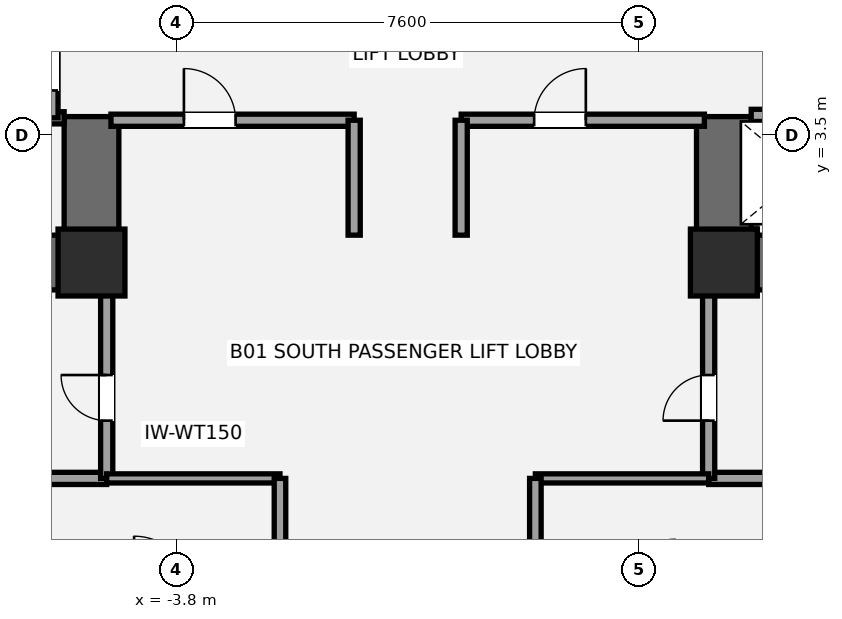
"""IFC4 building model, lengths in metres.
Left out: names, types, materials, properties, quantities, classifications, styles, units other than length and angle.
Written with IfcOpenShell. Run it as: python <this file> out.ifc"""

import sys

from ifc_helpers import new_model, si_unit, direction, frame, frame_2d, origin, origin_2d, place, context, subcontext, project, spatial, rectangle, extrude, element, fill, save


model = new_model("IFC4")
c1 = context("Model", 3, precision=1e-05, world=origin(), true_north=direction((0.0, 1.0)))
c2 = subcontext(c1, "Body", "Model", "MODEL_VIEW")
j1 = project(units=[si_unit("LENGTHUNIT", "METRE"), si_unit("PLANEANGLEUNIT", "RADIAN")], contexts=[c1])
p1 = place(None, origin())
s1 = spatial("IfcSite", under=j1, at=p1, CompositionType="ELEMENT")
p2 = place(p1, origin())
s2 = spatial("IfcBuilding", under=s1, at=p2, CompositionType="ELEMENT")
p3 = place(p2, frame((0.0, 0.0, -4.4)))
s3 = spatial("IfcBuildingStorey", under=s2, at=p3, CompositionType="ELEMENT", Elevation=-4.4)
p4 = place(p3, frame((-4.75, 1.4, 0.0), z_axis=(0.0, 0.0, 1.0), x_axis=(-1.0, 0.0, 0.0)))
e1 = element("IfcWall", 1, at=p4, inside=s3, PredefinedType="SHEAR", context=c2, shape_type="SweptSolid", body=[
    extrude(rectangle(XDim=9.3, YDim=0.9, at=frame_2d((4.65, 0.0))), origin(), (0.0, 0.0, 1.0), 4.4),
])
p5 = place(p4, frame((5.55, 0.0, 0.0)))
e2 = element("IfcOpeningElement", 2, at=p5, cuts=e1, PredefinedType="OPENING", context=c2, shape_type="SweptSolid", body=[
    extrude(rectangle(XDim=1.05, YDim=2.15, at=frame_2d((0.525, 1.075))), frame((0.0, 0.46, 0.0), z_axis=(0.0, -1.0, 0.0), x_axis=(1.0, 0.0, 0.0)), (0.0, 0.0, 1.0), 0.92),
])
p6 = place(p4, frame((3.88, 0.0, 0.0)))
e3 = element("IfcOpeningElement", 3, at=p6, cuts=e1, PredefinedType="OPENING", context=c2, shape_type="SweptSolid", body=[
    extrude(rectangle(XDim=1.1, YDim=2.2, at=frame_2d((0.55, 1.1))), frame((0.0, 0.46, 0.0), z_axis=(0.0, -1.0, 0.0), x_axis=(1.0, 0.0, 0.0)), (0.0, 0.0, 1.0), 0.92),
])
p7 = place(p3, frame((-5.2, 0.95, 0.0), z_axis=(0.0, 0.0, 1.0), x_axis=(0.0, 1.0, 0.0)))
e4 = element("IfcWall", 4, at=p7, inside=s3, PredefinedType="SHEAR", context=c2, shape_type="SweptSolid", body=[
    extrude(rectangle(XDim=2.85, YDim=0.9, at=frame_2d((1.425, 0.0))), origin(), (0.0, 0.0, 1.0), 4.4),
])
p8 = place(p3, frame((14.05, 1.4, 0.0), z_axis=(0.0, 0.0, 1.0), x_axis=(-1.0, 0.0, 0.0)))
e5 = element("IfcWall", 5, at=p8, inside=s3, PredefinedType="SHEAR", context=c2, shape_type="SweptSolid", body=[
    extrude(rectangle(XDim=9.3, YDim=0.9, at=frame_2d((4.65, 0.0))), origin(), (0.0, 0.0, 1.0), 4.4),
])
p9 = place(p8, frame((2.7, 0.0, 0.0)))
e6 = element("IfcOpeningElement", 6, at=p9, cuts=e5, PredefinedType="OPENING", context=c2, shape_type="SweptSolid", body=[
    extrude(rectangle(XDim=1.05, YDim=2.15, at=frame_2d((0.525, 1.075))), frame((0.0, 0.46, 0.0), z_axis=(0.0, -1.0, 0.0), x_axis=(1.0, 0.0, 0.0)), (0.0, 0.0, 1.0), 0.92),
])
p10 = place(p8, frame((4.7, 0.0, 0.0)))
e7 = element("IfcOpeningElement", 7, at=p10, cuts=e5, PredefinedType="OPENING", context=c2, shape_type="SweptSolid", body=[
    extrude(rectangle(XDim=1.1, YDim=2.2, at=frame_2d((0.55, 1.1))), frame((0.0, 0.46, 0.0), z_axis=(0.0, -1.0, 0.0), x_axis=(1.0, 0.0, 0.0)), (0.0, 0.0, 1.0), 0.92),
])
p11 = place(p3, frame((5.2, 0.95, 0.0), z_axis=(0.0, 0.0, 1.0), x_axis=(0.0, 1.0, 0.0)))
e8 = element("IfcWall", 8, at=p11, inside=s3, PredefinedType="SHEAR", context=c2, shape_type="SweptSolid", body=[
    extrude(rectangle(XDim=2.85, YDim=0.9, at=frame_2d((1.425, 0.0))), origin(), (0.0, 0.0, 1.0), 4.4),
])
for number, where, z_axis, x_axis in (
    (9, (-5.2, 1.4, 0.0), (0.0, 0.0, 1.0), (1.0, 0.0, 0.0)),
    (10, (5.2, 1.4, 0.0), (0.0, 0.0, 1.0), (1.0, 0.0, 0.0)),
):
    element("IfcColumn", number, at=place(p3, frame(where, z_axis=z_axis, x_axis=x_axis)), inside=s3, PredefinedType="COLUMN", context=c2, shape_type="SweptSolid", body=[
        extrude(rectangle(XDim=1.1, YDim=1.1, at=origin_2d()), origin(), (0.0, 0.0, 1.0), 4.4),
    ])
p12 = place(p3, frame((-7.2, -2.15, 0.0), z_axis=(0.0, 0.0, 1.0), x_axis=(1.0, 0.0, 0.0)))
e11 = element("IfcWall", 11, at=p12, inside=s3, PredefinedType="SOLIDWALL", context=c2, shape_type="SweptSolid", body=[
    extrude(rectangle(XDim=2.25, YDim=0.2, at=frame_2d((1.125, 0.0))), origin(), (0.0, 0.0, 1.0), 4.14),
])
p13 = place(p3, frame((-4.95, -2.15, 0.0), z_axis=(0.0, 0.0, 1.0), x_axis=(0.0, 1.0, 0.0)))
e12 = element("IfcWall", 12, at=p13, inside=s3, PredefinedType="SOLIDWALL", context=c2, shape_type="SweptSolid", body=[
    extrude(rectangle(XDim=3.15, YDim=0.2, at=frame_2d((1.575, 0.0))), origin(), (0.0, 0.0, 1.0), 3.508),
])
p14 = place(p13, frame((0.95, 0.0, 0.0)))
e13 = element("IfcOpeningElement", 13, at=p14, cuts=e12, PredefinedType="OPENING", context=c2, shape_type="SweptSolid", body=[
    extrude(rectangle(XDim=0.75, YDim=2.1, at=frame_2d((0.375, 1.05))), frame((0.0, 0.11, 0.0), z_axis=(0.0, -1.0, 0.0), x_axis=(1.0, 0.0, 0.0)), (0.0, 0.0, 1.0), 0.22),
])
p15 = place(p3, frame((4.95, -2.15, 0.0), z_axis=(0.0, 0.0, 1.0), x_axis=(1.0, 0.0, 0.0)))
e14 = element("IfcWall", 14, at=p15, inside=s3, PredefinedType="SOLIDWALL", context=c2, shape_type="SweptSolid", body=[
    extrude(rectangle(XDim=2.25, YDim=0.2, at=frame_2d((1.125, 0.0))), origin(), (0.0, 0.0, 1.0), 4.14),
])
p16 = place(p3, frame((4.95, -2.15, 0.0), z_axis=(0.0, 0.0, 1.0), x_axis=(0.0, 1.0, 0.0)))
e15 = element("IfcWall", 15, at=p16, inside=s3, PredefinedType="SOLIDWALL", context=c2, shape_type="SweptSolid", body=[
    extrude(rectangle(XDim=3.15, YDim=0.2, at=frame_2d((1.575, 0.0))), origin(), (0.0, 0.0, 1.0), 3.508),
])
p17 = place(p16, frame((0.95, 0.0, 0.0)))
e16 = element("IfcOpeningElement", 16, at=p17, cuts=e15, PredefinedType="OPENING", context=c2, shape_type="SweptSolid", body=[
    extrude(rectangle(XDim=0.75, YDim=2.1, at=frame_2d((0.375, 1.05))), frame((0.0, 0.11, 0.0), z_axis=(0.0, -1.0, 0.0), x_axis=(1.0, 0.0, 0.0)), (0.0, 0.0, 1.0), 0.22),
])
p18 = place(p3, frame((-9.78, 3.78, 0.0), z_axis=(0.0, 0.0, 1.0), x_axis=(1.0, 0.0, 0.0)))
e17 = element("IfcWall", 17, at=p18, inside=s3, PredefinedType="SOLIDWALL", context=c2, shape_type="SweptSolid", body=[
    extrude(rectangle(XDim=4.13, YDim=0.2, at=frame_2d((2.065, 0.0))), origin(), (0.0, 0.0, 1.0), 4.14),
])
p19 = place(p3, frame((-5.85, 3.78, 0.0), z_axis=(0.0, 0.0, 1.0), x_axis=(0.0, 1.0, 0.0)))
e18 = element("IfcWall", 18, at=p19, inside=s3, PredefinedType="SOLIDWALL", context=c2, shape_type="SweptSolid", body=[
    extrude(rectangle(XDim=1.69, YDim=0.2, at=frame_2d((0.845, 0.0))), origin(), (0.0, 0.0, 1.0), 4.14),
])
p20 = place(p19, frame((0.45, 0.0, 0.0)))
e19 = element("IfcOpeningElement", 19, at=p20, cuts=e18, PredefinedType="OPENING", context=c2, shape_type="SweptSolid", body=[
    extrude(rectangle(XDim=0.85, YDim=2.1, at=frame_2d((0.425, 1.05))), frame((0.0, 0.11, 0.0), z_axis=(0.0, -1.0, 0.0), x_axis=(1.0, 0.0, 0.0)), (0.0, 0.0, 1.0), 0.22),
])
p21 = place(p3, frame((5.65, 3.82, 0.0), z_axis=(0.0, 0.0, 1.0), x_axis=(1.0, 0.0, 0.0)))
e20 = element("IfcWall", 20, at=p21, inside=s3, PredefinedType="SOLIDWALL", context=c2, shape_type="SweptSolid", body=[
    extrude(rectangle(XDim=4.13, YDim=0.2, at=frame_2d((2.065, 0.0))), origin(), (0.0, 0.0, 1.0), 4.14),
])
p22 = place(p21, frame((0.65, 0.0, 0.0)))
e21 = element("IfcOpeningElement", 21, at=p22, cuts=e20, PredefinedType="OPENING", context=c2, shape_type="SweptSolid", body=[
    extrude(rectangle(XDim=1.2, YDim=2.2, at=frame_2d((0.6, 1.1))), frame((0.0, 0.11, 0.0), z_axis=(0.0, -1.0, 0.0), x_axis=(1.0, 0.0, 0.0)), (0.0, 0.0, 1.0), 0.22),
])
p23 = place(p3, frame((-4.88, 3.74, 0.0), z_axis=(0.0, 0.0, 1.0), x_axis=(1.0, 0.0, 0.0)))
e22 = element("IfcWall", 22, at=p23, inside=s3, PredefinedType="SOLIDWALL", context=c2, shape_type="SweptSolid", body=[
    extrude(rectangle(XDim=4.0, YDim=0.2, at=frame_2d((2.0, 0.0))), origin(), (0.0, 0.0, 1.0), 4.14),
])
p24 = place(p23, frame((1.2, 0.0, 0.0)))
e23 = element("IfcOpeningElement", 23, at=p24, cuts=e22, PredefinedType="OPENING", context=c2, shape_type="SweptSolid", body=[
    extrude(rectangle(XDim=0.85, YDim=2.1, at=frame_2d((0.425, 1.05))), frame((0.0, 0.11, 0.0), z_axis=(0.0, -1.0, 0.0), x_axis=(1.0, 0.0, 0.0)), (0.0, 0.0, 1.0), 0.22),
])
p25 = place(p3, frame((0.88, 3.74, 0.0), z_axis=(0.0, 0.0, 1.0), x_axis=(1.0, 0.0, 0.0)))
e24 = element("IfcWall", 24, at=p25, inside=s3, PredefinedType="SOLIDWALL", context=c2, shape_type="SweptSolid", body=[
    extrude(rectangle(XDim=4.0, YDim=0.2, at=frame_2d((2.0, 0.0))), origin(), (0.0, 0.0, 1.0), 4.14),
])
p26 = place(p25, frame((1.2, 0.0, 0.0)))
e25 = element("IfcOpeningElement", 25, at=p26, cuts=e24, PredefinedType="OPENING", context=c2, shape_type="SweptSolid", body=[
    extrude(rectangle(XDim=0.85, YDim=2.1, at=frame_2d((0.425, 1.05))), frame((0.0, 0.11, 0.0), z_axis=(0.0, -1.0, 0.0), x_axis=(1.0, 0.0, 0.0)), (0.0, 0.0, 1.0), 0.22),
])
for number, where, z_axis, x_axis in (
    (26, (-0.88, 1.85, 0.0), (0.0, 0.0, 1.0), (0.0, 1.0, 0.0)),
    (27, (0.88, 1.85, 0.0), (0.0, 0.0, 1.0), (0.0, 1.0, 0.0)),
):
    element("IfcWall", number, at=place(p3, frame(where, z_axis=z_axis, x_axis=x_axis)), inside=s3, PredefinedType="SOLIDWALL", context=c2, shape_type="SweptSolid", body=[
        extrude(rectangle(XDim=1.89, YDim=0.2, at=frame_2d((0.945, 0.0))), origin(), (0.0, 0.0, 1.0), 4.14),
    ])
p27 = place(p3, frame((-4.95, -2.15, 0.0), z_axis=(0.0, 0.0, 1.0), x_axis=(1.0, 0.0, 0.0)))
e28 = element("IfcWall", 28, at=p27, inside=s3, PredefinedType="PLUMBINGWALL", context=c2, shape_type="SweptSolid", body=[
    extrude(rectangle(XDim=2.85, YDim=0.15, at=frame_2d((1.425, 0.0))), origin(), (0.0, 0.0, 1.0), 4.14),
])
p28 = place(p3, frame((-2.1, -4.05, 0.0), z_axis=(0.0, 0.0, 1.0), x_axis=(0.0, 1.0, 0.0)))
e29 = element("IfcWall", 29, at=p28, inside=s3, PredefinedType="PLUMBINGWALL", context=c2, shape_type="SweptSolid", body=[
    extrude(rectangle(XDim=1.9, YDim=0.19, at=frame_2d((0.95, 0.0))), origin(), (0.0, 0.0, 1.0), 4.14),
])
p29 = place(p3, frame((2.1, -2.15, 0.0), z_axis=(0.0, 0.0, 1.0), x_axis=(1.0, 0.0, 0.0)))
e30 = element("IfcWall", 30, at=p29, inside=s3, PredefinedType="PLUMBINGWALL", context=c2, shape_type="SweptSolid", body=[
    extrude(rectangle(XDim=2.85, YDim=0.15, at=frame_2d((1.425, 0.0))), origin(), (0.0, 0.0, 1.0), 4.14),
])
p30 = place(p3, frame((2.1, -4.05, 0.0), z_axis=(0.0, 0.0, 1.0), x_axis=(0.0, 1.0, 0.0)))
e31 = element("IfcWall", 31, at=p30, inside=s3, PredefinedType="PLUMBINGWALL", context=c2, shape_type="SweptSolid", body=[
    extrude(rectangle(XDim=1.9, YDim=0.19, at=frame_2d((0.95, 0.0))), origin(), (0.0, 0.0, 1.0), 4.14),
])
p31 = place(p14, origin())
e32 = element("IfcDoor", 32, at=p31, inside=s3, OperationType="SINGLE_SWING_RIGHT", PredefinedType="DOOR", context=c2, shape_type="SweptSolid", body=[
    extrude(rectangle(XDim=0.75, YDim=2.1, at=frame_2d((0.375, 1.05))), frame((0.0, 0.025, 0.0), z_axis=(0.0, -1.0, 0.0), x_axis=(1.0, 0.0, 0.0)), (0.0, 0.0, 1.0), 0.05),
])
fill(e13, e32)
p32 = place(p17, origin())
e33 = element("IfcDoor", 33, at=p32, inside=s3, OperationType="SINGLE_SWING_LEFT", PredefinedType="DOOR", context=c2, shape_type="SweptSolid", body=[
    extrude(rectangle(XDim=0.75, YDim=2.1, at=frame_2d((0.375, 1.05))), frame((0.0, 0.025, 0.0), z_axis=(0.0, -1.0, 0.0), x_axis=(1.0, 0.0, 0.0)), (0.0, 0.0, 1.0), 0.05),
])
fill(e16, e33)
p33 = place(p20, origin())
e34 = element("IfcDoor", 34, at=p33, inside=s3, OperationType="SINGLE_SWING_RIGHT", PredefinedType="DOOR", context=c2, shape_type="SweptSolid", body=[
    extrude(rectangle(XDim=0.85, YDim=2.1, at=frame_2d((0.425, 1.05))), frame((0.0, 0.025, 0.0), z_axis=(0.0, -1.0, 0.0), x_axis=(1.0, 0.0, 0.0)), (0.0, 0.0, 1.0), 0.05),
])
fill(e19, e34)
p34 = place(p24, origin())
e35 = element("IfcDoor", 35, at=p34, inside=s3, OperationType="SINGLE_SWING_LEFT", PredefinedType="DOOR", context=c2, shape_type="SweptSolid", body=[
    extrude(rectangle(XDim=0.85, YDim=2.1, at=frame_2d((0.425, 1.05))), frame((0.0, 0.025, 0.0), z_axis=(0.0, -1.0, 0.0), x_axis=(1.0, 0.0, 0.0)), (0.0, 0.0, 1.0), 0.05),
])
fill(e23, e35)
p35 = place(p26, origin())
e36 = element("IfcDoor", 36, at=p35, inside=s3, OperationType="SINGLE_SWING_RIGHT", PredefinedType="DOOR", context=c2, shape_type="SweptSolid", body=[
    extrude(rectangle(XDim=0.85, YDim=2.1, at=frame_2d((0.425, 1.05))), frame((0.0, 0.025, 0.0), z_axis=(0.0, -1.0, 0.0), x_axis=(1.0, 0.0, 0.0)), (0.0, 0.0, 1.0), 0.05),
])
fill(e25, e36)
save(model, sys.argv[1])
